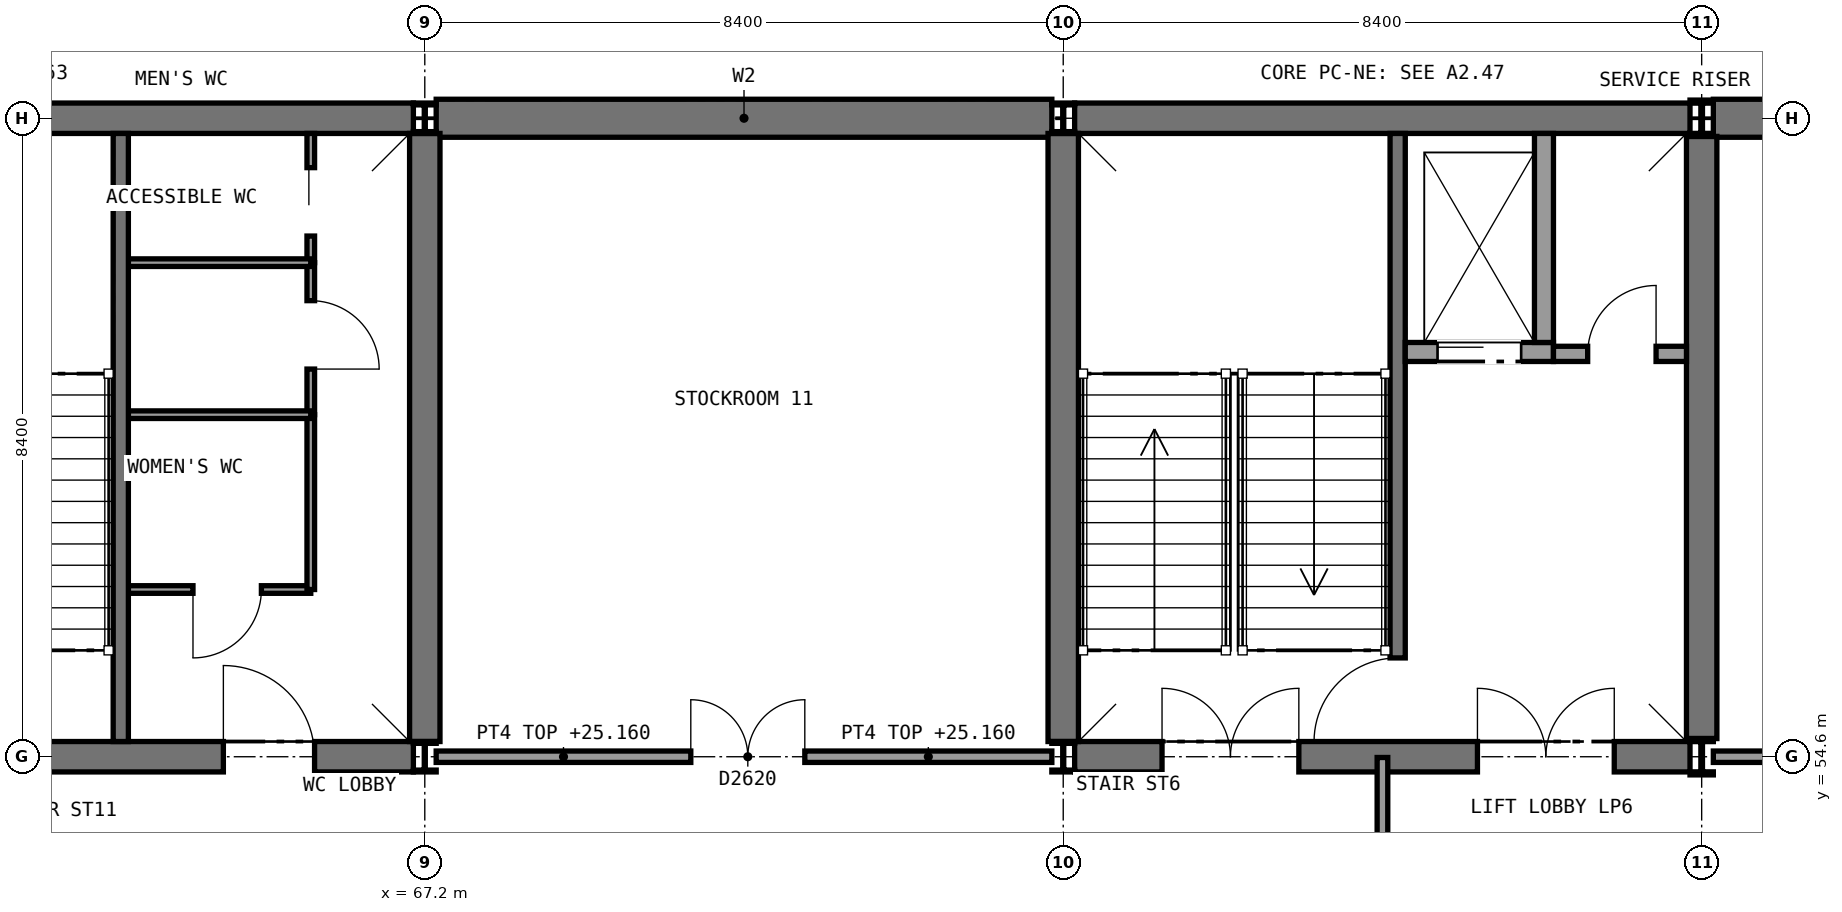
"""IFC4 building model, lengths in metres.
Left out: names, types, materials, properties, quantities, classifications, styles, units other than length and angle.
Written with IfcOpenShell. Run it as: python <this file> out.ifc"""

import sys

from ifc_helpers import new_model, si_unit, direction, frame, frame_2d, origin, origin_2d, place, context, subcontext, project, spatial, rectangle, i_section, extrude, element, fill, save


model = new_model("IFC4")
c1 = context("Model", 3, precision=1e-05, world=origin(), true_north=direction((0.0, 1.0)))
c2 = subcontext(c1, "Body", "Model", "MODEL_VIEW")
j1 = project(units=[si_unit("LENGTHUNIT", "METRE"), si_unit("PLANEANGLEUNIT", "RADIAN")], contexts=[c1])
p1 = place(None, origin())
s1 = spatial("IfcSite", under=j1, at=p1, CompositionType="ELEMENT")
p2 = place(p1, origin())
s2 = spatial("IfcBuilding", under=s1, at=p2, CompositionType="ELEMENT")
p3 = place(p2, frame((0.0, 0.0, 21.0)))
s3 = spatial("IfcBuildingStorey", under=s2, at=p3, CompositionType="ELEMENT", Elevation=21.0)
p4 = place(p3, frame((67.35, 63.0, 0.0), z_axis=(0.0, 0.0, 1.0), x_axis=(1.0, 0.0, 0.0)))
e1 = element("IfcWall", 1, at=p4, inside=s3, PredefinedType="SHEAR", context=c2, shape_type="SweptSolid", body=[
    extrude(rectangle(XDim=8.1, YDim=0.5, at=frame_2d((4.05, 0.0))), origin(), (0.0, 0.0, 1.0), 4.65),
])
p5 = place(p3, frame((84.154, 63.0, 0.0), z_axis=(0.0, 0.0, 1.0), x_axis=(1.0, 0.0, 0.0)))
e2 = element("IfcWall", 2, at=p5, inside=s3, PredefinedType="SHEAR", context=c2, shape_type="SweptSolid", body=[
    extrude(rectangle(XDim=8.093, YDim=0.5, at=frame_2d((4.046, 0.0))), origin(), (0.0, 0.0, 1.0), 4.65),
])
p6 = place(p3, frame((75.75, 63.0, 0.0), z_axis=(0.0, 0.0, 1.0), x_axis=(1.0, 0.0, 0.0)))
e3 = element("IfcWall", 3, at=p6, inside=s3, PredefinedType="SHEAR", context=c2, shape_type="SweptSolid", body=[
    extrude(rectangle(XDim=8.096, YDim=0.4, at=frame_2d((4.048, 0.0))), origin(), (0.0, 0.0, 1.0), 4.65),
])
p7 = place(p3, frame((75.75, 54.6, 0.0), z_axis=(0.0, 0.0, 1.0), x_axis=(1.0, 0.0, 0.0)))
e4 = element("IfcWall", 4, at=p7, inside=s3, PredefinedType="SHEAR", context=c2, shape_type="SweptSolid", body=[
    extrude(rectangle(XDim=8.096, YDim=0.4, at=frame_2d((4.048, 0.0))), origin(), (0.0, 0.0, 1.0), 4.65),
])
p8 = place(p7, frame((1.15, 0.0, 0.0)))
e5 = element("IfcOpeningElement", 5, at=p8, cuts=e4, PredefinedType="OPENING", context=c2, shape_type="SweptSolid", body=[
    extrude(rectangle(XDim=1.8, YDim=2.1, at=frame_2d((0.9, 1.05))), frame((0.0, 0.21, 0.0), z_axis=(0.0, -1.0, 0.0), x_axis=(1.0, 0.0, 0.0)), (0.0, 0.0, 1.0), 0.42),
])
p9 = place(p7, frame((5.3, 0.0, 0.0)))
e6 = element("IfcOpeningElement", 6, at=p9, cuts=e4, PredefinedType="OPENING", context=c2, shape_type="SweptSolid", body=[
    extrude(rectangle(XDim=1.8, YDim=2.1, at=frame_2d((0.9, 1.05))), frame((0.0, 0.21, 0.0), z_axis=(0.0, -1.0, 0.0), x_axis=(1.0, 0.0, 0.0)), (0.0, 0.0, 1.0), 0.42),
])
p10 = place(p3, frame((75.6, 54.8, 0.0), z_axis=(0.0, 0.0, 1.0), x_axis=(0.0, 1.0, 0.0)))
e7 = element("IfcWall", 7, at=p10, inside=s3, PredefinedType="SHEAR", context=c2, shape_type="SweptSolid", body=[
    extrude(rectangle(XDim=8.0, YDim=0.4, at=frame_2d((4.0, 0.0))), origin(), (0.0, 0.0, 1.0), 4.65),
])
p11 = place(p3, frame((84.0, 54.839, 0.0), z_axis=(0.0, 0.0, 1.0), x_axis=(0.0, 1.0, 0.0)))
e8 = element("IfcWall", 8, at=p11, inside=s3, PredefinedType="SHEAR", context=c2, shape_type="SweptSolid", body=[
    extrude(rectangle(XDim=7.922, YDim=0.4, at=frame_2d((3.961, 0.0))), origin(), (0.0, 0.0, 1.0), 4.65),
])
p12 = place(p3, frame((58.95, 63.0, 0.0), z_axis=(0.0, 0.0, 1.0), x_axis=(1.0, 0.0, 0.0)))
e9 = element("IfcWall", 9, at=p12, inside=s3, PredefinedType="SHEAR", context=c2, shape_type="SweptSolid", body=[
    extrude(rectangle(XDim=8.1, YDim=0.4, at=frame_2d((4.05, 0.0))), origin(), (0.0, 0.0, 1.0), 4.65),
])
p13 = place(p3, frame((58.95, 54.6, 0.0), z_axis=(0.0, 0.0, 1.0), x_axis=(1.0, 0.0, 0.0)))
e10 = element("IfcWall", 10, at=p13, inside=s3, PredefinedType="SHEAR", context=c2, shape_type="SweptSolid", body=[
    extrude(rectangle(XDim=8.1, YDim=0.4, at=frame_2d((4.05, 0.0))), origin(), (0.0, 0.0, 1.0), 4.65),
])
p14 = place(p13, frame((1.15, 0.0, 0.0)))
e11 = element("IfcOpeningElement", 11, at=p14, cuts=e10, PredefinedType="OPENING", context=c2, shape_type="SweptSolid", body=[
    extrude(rectangle(XDim=1.8, YDim=2.1, at=frame_2d((0.9, 1.05))), frame((0.0, 0.21, 0.0), z_axis=(0.0, -1.0, 0.0), x_axis=(1.0, 0.0, 0.0)), (0.0, 0.0, 1.0), 0.42),
])
p15 = place(p13, frame((5.6, 0.0, 0.0)))
e12 = element("IfcOpeningElement", 12, at=p15, cuts=e10, PredefinedType="OPENING", context=c2, shape_type="SweptSolid", body=[
    extrude(rectangle(XDim=1.2, YDim=2.1, at=frame_2d((0.6, 1.05))), frame((0.0, 0.21, 0.0), z_axis=(0.0, -1.0, 0.0), x_axis=(1.0, 0.0, 0.0)), (0.0, 0.0, 1.0), 0.42),
])
p16 = place(p3, frame((67.2, 54.8, 0.0), z_axis=(0.0, 0.0, 1.0), x_axis=(0.0, 1.0, 0.0)))
e13 = element("IfcWall", 13, at=p16, inside=s3, PredefinedType="SHEAR", context=c2, shape_type="SweptSolid", body=[
    extrude(rectangle(XDim=8.0, YDim=0.4, at=frame_2d((4.0, 0.0))), origin(), (0.0, 0.0, 1.0), 4.65),
])
for number, where, z_axis, x_axis in (
    (14, (67.2, 54.6, 0.0), (0.0, 0.0, 1.0), (1.0, 0.0, 0.0)),
    (15, (67.2, 63.0, 0.0), (0.0, 0.0, 1.0), (1.0, 0.0, 0.0)),
    (16, (75.6, 54.6, 0.0), (0.0, 0.0, 1.0), (1.0, 0.0, 0.0)),
    (17, (75.6, 63.0, 0.0), (0.0, 0.0, 1.0), (1.0, 0.0, 0.0)),
):
    element("IfcColumn", number, at=place(p3, frame(where, z_axis=z_axis, x_axis=x_axis)), inside=s3, PredefinedType="COLUMN", context=c2, shape_type="SweptSolid", body=[
        extrude(i_section(OverallWidth=0.3, OverallDepth=0.4, WebThickness=0.013, FlangeThickness=0.024, FilletRadius=0.027, at=origin_2d()), origin(), (0.0, 0.0, 1.0), 4.8),
    ])
for number, where, z_axis, x_axis in (
    (18, (84.0, 54.6, 0.0), (0.0, 0.0, 1.0), (1.0, 0.0, 0.0)),
    (19, (84.0, 63.0, 0.0), (0.0, 0.0, 1.0), (1.0, 0.0, 0.0)),
):
    element("IfcColumn", number, at=place(p3, frame(where, z_axis=z_axis, x_axis=x_axis)), inside=s3, PredefinedType="COLUMN", context=c2, shape_type="SweptSolid", body=[
        extrude(i_section(OverallWidth=0.307, OverallDepth=0.478, WebThickness=0.021, FlangeThickness=0.04, FilletRadius=0.027, at=origin_2d()), origin(), (0.0, 0.0, 1.0), 4.8),
    ])
p17 = place(p3, frame((63.3, 56.8, 0.0), z_axis=(0.0, 0.0, 1.0), x_axis=(1.0, 0.0, 0.0)))
e20 = element("IfcWall", 20, at=p17, inside=s3, PredefinedType="PARTITIONING", context=c2, shape_type="SweptSolid", body=[
    extrude(rectangle(XDim=2.4, YDim=0.1, at=frame_2d((1.2, 0.0))), origin(), (0.0, 0.0, 1.0), 4.58),
])
p18 = place(p17, frame((0.85, 0.0, 0.0)))
e21 = element("IfcOpeningElement", 21, at=p18, cuts=e20, PredefinedType="OPENING", context=c2, shape_type="SweptSolid", body=[
    extrude(rectangle(XDim=0.9, YDim=2.1, at=frame_2d((0.45, 1.05))), frame((0.0, 0.06, 0.0), z_axis=(0.0, -1.0, 0.0), x_axis=(1.0, 0.0, 0.0)), (0.0, 0.0, 1.0), 0.12),
])
p19 = place(p3, frame((65.7, 56.8, 0.0), z_axis=(0.0, 0.0, 1.0), x_axis=(0.0, 1.0, 0.0)))
e22 = element("IfcWall", 22, at=p19, inside=s3, PredefinedType="PARTITIONING", context=c2, shape_type="SweptSolid", body=[
    extrude(rectangle(XDim=2.3, YDim=0.1, at=frame_2d((1.15, 0.0))), origin(), (0.0, 0.0, 1.0), 4.58),
])
p20 = place(p3, frame((65.7, 59.1, 0.0), z_axis=(0.0, 0.0, 1.0), x_axis=(0.0, 1.0, 0.0)))
e23 = element("IfcWall", 23, at=p20, inside=s3, PredefinedType="PARTITIONING", context=c2, shape_type="SweptSolid", body=[
    extrude(rectangle(XDim=2.0, YDim=0.1, at=frame_2d((1.0, 0.0))), origin(), (0.0, 0.0, 1.0), 4.58),
])
p21 = place(p20, frame((0.6, 0.0, 0.0)))
e24 = element("IfcOpeningElement", 24, at=p21, cuts=e23, PredefinedType="OPENING", context=c2, shape_type="SweptSolid", body=[
    extrude(rectangle(XDim=0.9, YDim=2.1, at=frame_2d((0.45, 1.05))), frame((0.0, 0.06, 0.0), z_axis=(0.0, -1.0, 0.0), x_axis=(1.0, 0.0, 0.0)), (0.0, 0.0, 1.0), 0.12),
])
p22 = place(p3, frame((65.7, 61.1, 0.0), z_axis=(0.0, 0.0, 1.0), x_axis=(0.0, 1.0, 0.0)))
e25 = element("IfcWall", 25, at=p22, inside=s3, PredefinedType="PARTITIONING", context=c2, shape_type="SweptSolid", body=[
    extrude(rectangle(XDim=1.7, YDim=0.1, at=frame_2d((0.85, 0.0))), origin(), (0.0, 0.0, 1.0), 4.58),
])
p23 = place(p22, frame((0.35, 0.0, 0.0)))
e26 = element("IfcOpeningElement", 26, at=p23, cuts=e25, PredefinedType="OPENING", context=c2, shape_type="SweptSolid", body=[
    extrude(rectangle(XDim=0.9, YDim=2.1, at=frame_2d((0.45, 1.05))), frame((0.0, 0.06, 0.0), z_axis=(0.0, -1.0, 0.0), x_axis=(1.0, 0.0, 0.0)), (0.0, 0.0, 1.0), 0.12),
])
for number, where, z_axis, x_axis in (
    (27, (63.3, 59.1, 0.0), (0.0, 0.0, 1.0), (1.0, 0.0, 0.0)),
    (28, (63.3, 61.1, 0.0), (0.0, 0.0, 1.0), (1.0, 0.0, 0.0)),
):
    element("IfcWall", number, at=place(p3, frame(where, z_axis=z_axis, x_axis=x_axis)), inside=s3, PredefinedType="PARTITIONING", context=c2, shape_type="SweptSolid", body=[
        extrude(rectangle(XDim=2.4, YDim=0.1, at=frame_2d((1.2, 0.0))), origin(), (0.0, 0.0, 1.0), 4.58),
    ])
p24 = place(p3, frame((67.35, 54.6, 0.0), z_axis=(0.0, 0.0, 1.0), x_axis=(1.0, 0.0, 0.0)))
e29 = element("IfcWall", 29, at=p24, inside=s3, PredefinedType="SOLIDWALL", context=c2, shape_type="SweptSolid", body=[
    extrude(rectangle(XDim=8.1, YDim=0.15, at=frame_2d((4.05, 0.0))), origin(), (0.0, 0.0, 1.0), 4.16),
])
p25 = place(p24, frame((3.35, 0.0, 0.0)))
e30 = element("IfcOpeningElement", 30, at=p25, cuts=e29, PredefinedType="OPENING", context=c2, shape_type="SweptSolid", body=[
    extrude(rectangle(XDim=1.5, YDim=2.1, at=frame_2d((0.75, 1.05))), frame((0.0, 0.085, 0.0), z_axis=(0.0, -1.0, 0.0), x_axis=(1.0, 0.0, 0.0)), (0.0, 0.0, 1.0), 0.17),
])
p26 = place(p3, frame((84.154, 54.6, 0.0), z_axis=(0.0, 0.0, 1.0), x_axis=(1.0, 0.0, 0.0)))
e31 = element("IfcWall", 31, at=p26, inside=s3, PredefinedType="SOLIDWALL", context=c2, shape_type="SweptSolid", body=[
    extrude(rectangle(XDim=8.093, YDim=0.15, at=frame_2d((4.046, 0.0))), origin(), (0.0, 0.0, 1.0), 4.3),
])
p27 = place(p3, frame((79.8, 47.2, 0.0), z_axis=(0.0, 0.0, 1.0), x_axis=(0.0, 1.0, 0.0)))
e32 = element("IfcWall", 32, at=p27, inside=s3, PredefinedType="PARTITIONING", context=c2, shape_type="SweptSolid", body=[
    extrude(rectangle(XDim=7.39, YDim=0.14, at=frame_2d((3.695, 0.0))), origin(), (0.0, 0.0, 1.0), 4.65),
])
p28 = place(p3, frame((80.0, 62.8, 0.0), z_axis=(0.0, 0.0, 1.0), x_axis=(0.0, -1.0, 0.0)))
e33 = element("IfcWall", 33, at=p28, inside=s3, PredefinedType="SHEAR", context=c2, shape_type="SweptSolid", body=[
    extrude(rectangle(XDim=8.0, YDim=0.2, at=frame_2d((4.0, 0.0))), origin(), (0.0, 0.0, 1.0), 4.65),
])
p29 = place(p28, frame((6.9, 0.0, 0.0)))
e34 = element("IfcOpeningElement", 34, at=p29, cuts=e33, PredefinedType="OPENING", context=c2, shape_type="SweptSolid", body=[
    extrude(rectangle(XDim=1.11, YDim=2.1, at=frame_2d((0.555, 1.05))), frame((0.0, 0.11, 0.0), z_axis=(0.0, -1.0, 0.0), x_axis=(1.0, 0.0, 0.0)), (0.0, 0.0, 1.0), 0.22),
])
p30 = place(p3, frame((80.1, 59.925, 0.0), z_axis=(0.0, 0.0, 1.0), x_axis=(1.0, 0.0, 0.0)))
e35 = element("IfcWall", 35, at=p30, inside=s3, PredefinedType="SOLIDWALL", context=c2, shape_type="SweptSolid", body=[
    extrude(rectangle(XDim=1.95, YDim=0.25, at=frame_2d((0.975, 0.0))), origin(), (0.0, 0.0, 1.0), 4.8),
])
p31 = place(p30, frame((0.425, 0.0, 0.0)))
e36 = element("IfcOpeningElement", 36, at=p31, cuts=e35, PredefinedType="OPENING", context=c2, shape_type="SweptSolid", body=[
    extrude(rectangle(XDim=1.1, YDim=2.1, at=frame_2d((0.55, 1.05))), frame((0.0, 0.135, 0.0), z_axis=(0.0, -1.0, 0.0), x_axis=(1.0, 0.0, 0.0)), (0.0, 0.0, 1.0), 0.27),
])
p32 = place(p3, frame((81.925, 62.8, 0.0), z_axis=(0.0, 0.0, 1.0), x_axis=(0.0, -1.0, 0.0)))
e37 = element("IfcWall", 37, at=p32, inside=s3, PredefinedType="SOLIDWALL", context=c2, shape_type="SweptSolid", body=[
    extrude(rectangle(XDim=2.75, YDim=0.25, at=frame_2d((1.375, 0.0))), origin(), (0.0, 0.0, 1.0), 4.8),
])
p33 = place(p3, frame((82.05, 59.9, 0.0), z_axis=(0.0, 0.0, 1.0), x_axis=(1.0, 0.0, 0.0)))
e38 = element("IfcWall", 38, at=p33, inside=s3, PredefinedType="PARTITIONING", context=c2, shape_type="SweptSolid", body=[
    extrude(rectangle(XDim=1.75, YDim=0.2, at=frame_2d((0.875, 0.0))), origin(), (0.0, 0.0, 1.0), 4.65),
])
p34 = place(p33, frame((0.45, 0.0, 0.0)))
e39 = element("IfcOpeningElement", 39, at=p34, cuts=e38, PredefinedType="OPENING", context=c2, shape_type="SweptSolid", body=[
    extrude(rectangle(XDim=0.9, YDim=2.1, at=frame_2d((0.45, 1.05))), frame((0.0, 0.11, 0.0), z_axis=(0.0, -1.0, 0.0), x_axis=(1.0, 0.0, 0.0)), (0.0, 0.0, 1.0), 0.22),
])
p35 = place(p3, frame((63.2, 62.8, 0.0), z_axis=(0.0, 0.0, 1.0), x_axis=(0.0, -1.0, 0.0)))
e40 = element("IfcWall", 40, at=p35, inside=s3, PredefinedType="SHEAR", context=c2, shape_type="SweptSolid", body=[
    extrude(rectangle(XDim=8.0, YDim=0.2, at=frame_2d((4.0, 0.0))), origin(), (0.0, 0.0, 1.0), 4.65),
])
p36 = place(p18, frame((0.9, 0.0, 0.0), z_axis=(0.0, 0.0, 1.0), x_axis=(-1.0, 0.0, 0.0)))
e41 = element("IfcDoor", 41, at=p36, inside=s3, OperationType="SINGLE_SWING_RIGHT", PredefinedType="DOOR", context=c2, shape_type="SweptSolid", body=[
    extrude(rectangle(XDim=0.9, YDim=2.1, at=frame_2d((0.45, 1.05))), frame((0.0, 0.025, 0.0), z_axis=(0.0, -1.0, 0.0), x_axis=(1.0, 0.0, 0.0)), (0.0, 0.0, 1.0), 0.05),
])
fill(e21, e41)
p37 = place(p21, frame((0.9, 0.0, 0.0), z_axis=(0.0, 0.0, 1.0), x_axis=(-1.0, 0.0, 0.0)))
e42 = element("IfcDoor", 42, at=p37, inside=s3, OperationType="SINGLE_SWING_RIGHT", PredefinedType="DOOR", context=c2, shape_type="SweptSolid", body=[
    extrude(rectangle(XDim=0.9, YDim=2.1, at=frame_2d((0.45, 1.05))), frame((0.0, 0.025, 0.0), z_axis=(0.0, -1.0, 0.0), x_axis=(1.0, 0.0, 0.0)), (0.0, 0.0, 1.0), 0.05),
])
fill(e24, e42)
p38 = place(p23, origin())
e43 = element("IfcDoor", 43, at=p38, inside=s3, OperationType="SLIDING_TO_RIGHT", PredefinedType="DOOR", context=c2, shape_type="SweptSolid", body=[
    extrude(rectangle(XDim=0.9, YDim=2.1, at=frame_2d((0.45, 1.05))), frame((0.0, 0.025, 0.0), z_axis=(0.0, -1.0, 0.0), x_axis=(1.0, 0.0, 0.0)), (0.0, 0.0, 1.0), 0.05),
])
fill(e26, e43)
p39 = place(p25, origin())
e44 = element("IfcDoor", 44, at=p39, inside=s3, OperationType="DOUBLE_DOOR_SINGLE_SWING", PredefinedType="DOOR", context=c2, shape_type="SweptSolid", body=[
    extrude(rectangle(XDim=1.5, YDim=2.1, at=frame_2d((0.75, 1.05))), frame((0.0, 0.025, 0.0), z_axis=(0.0, -1.0, 0.0), x_axis=(1.0, 0.0, 0.0)), (0.0, 0.0, 1.0), 0.05),
])
fill(e30, e44)
p40 = place(p29, frame((1.1, 0.0, 0.0), z_axis=(0.0, 0.0, 1.0), x_axis=(-1.0, 0.0, 0.0)))
e45 = element("IfcDoor", 45, at=p40, inside=s3, OperationType="SINGLE_SWING_LEFT", PredefinedType="DOOR", context=c2, shape_type="SweptSolid", body=[
    extrude(rectangle(XDim=1.1, YDim=2.1, at=frame_2d((0.55, 1.05))), frame((0.0, 0.025, 0.0), z_axis=(0.0, -1.0, 0.0), x_axis=(1.0, 0.0, 0.0)), (0.0, 0.0, 1.0), 0.05),
])
fill(e34, e45)
p41 = place(p31, frame((1.1, 0.0, 0.0), z_axis=(0.0, 0.0, 1.0), x_axis=(-1.0, 0.0, 0.0)))
e46 = element("IfcDoor", 46, at=p41, inside=s3, OperationType="SLIDING_TO_RIGHT", PredefinedType="DOOR", context=c2, shape_type="SweptSolid", body=[
    extrude(rectangle(XDim=1.1, YDim=2.1, at=frame_2d((0.55, 1.05))), frame((0.0, 0.025, 0.0), z_axis=(0.0, -1.0, 0.0), x_axis=(1.0, 0.0, 0.0)), (0.0, 0.0, 1.0), 0.05),
])
fill(e36, e46)
p42 = place(p34, origin())
e47 = element("IfcDoor", 47, at=p42, inside=s3, OperationType="SINGLE_SWING_RIGHT", PredefinedType="DOOR", context=c2, shape_type="SweptSolid", body=[
    extrude(rectangle(XDim=0.9, YDim=2.1, at=frame_2d((0.45, 1.05))), frame((0.0, 0.025, 0.0), z_axis=(0.0, -1.0, 0.0), x_axis=(1.0, 0.0, 0.0)), (0.0, 0.0, 1.0), 0.05),
])
fill(e39, e47)
p43 = place(p8, origin())
e48 = element("IfcDoor", 48, at=p43, inside=s3, OperationType="DOUBLE_DOOR_SINGLE_SWING", PredefinedType="DOOR", context=c2, shape_type="SweptSolid", body=[
    extrude(rectangle(XDim=1.8, YDim=2.1, at=frame_2d((0.9, 1.05))), frame((0.0, 0.025, 0.0), z_axis=(0.0, -1.0, 0.0), x_axis=(1.0, 0.0, 0.0)), (0.0, 0.0, 1.0), 0.05),
])
fill(e5, e48)
p44 = place(p9, origin())
e49 = element("IfcDoor", 49, at=p44, inside=s3, OperationType="DOUBLE_DOOR_SINGLE_SWING", PredefinedType="DOOR", context=c2, shape_type="SweptSolid", body=[
    extrude(rectangle(XDim=1.8, YDim=2.1, at=frame_2d((0.9, 1.05))), frame((0.0, 0.025, 0.0), z_axis=(0.0, -1.0, 0.0), x_axis=(1.0, 0.0, 0.0)), (0.0, 0.0, 1.0), 0.05),
])
fill(e6, e49)
p45 = place(p15, origin())
e50 = element("IfcDoor", 50, at=p45, inside=s3, OperationType="SINGLE_SWING_LEFT", PredefinedType="DOOR", context=c2, shape_type="SweptSolid", body=[
    extrude(rectangle(XDim=1.2, YDim=2.1, at=frame_2d((0.6, 1.05))), frame((0.0, 0.025, 0.0), z_axis=(0.0, -1.0, 0.0), x_axis=(1.0, 0.0, 0.0)), (0.0, 0.0, 1.0), 0.05),
])
fill(e12, e50)
save(model, sys.argv[1])
